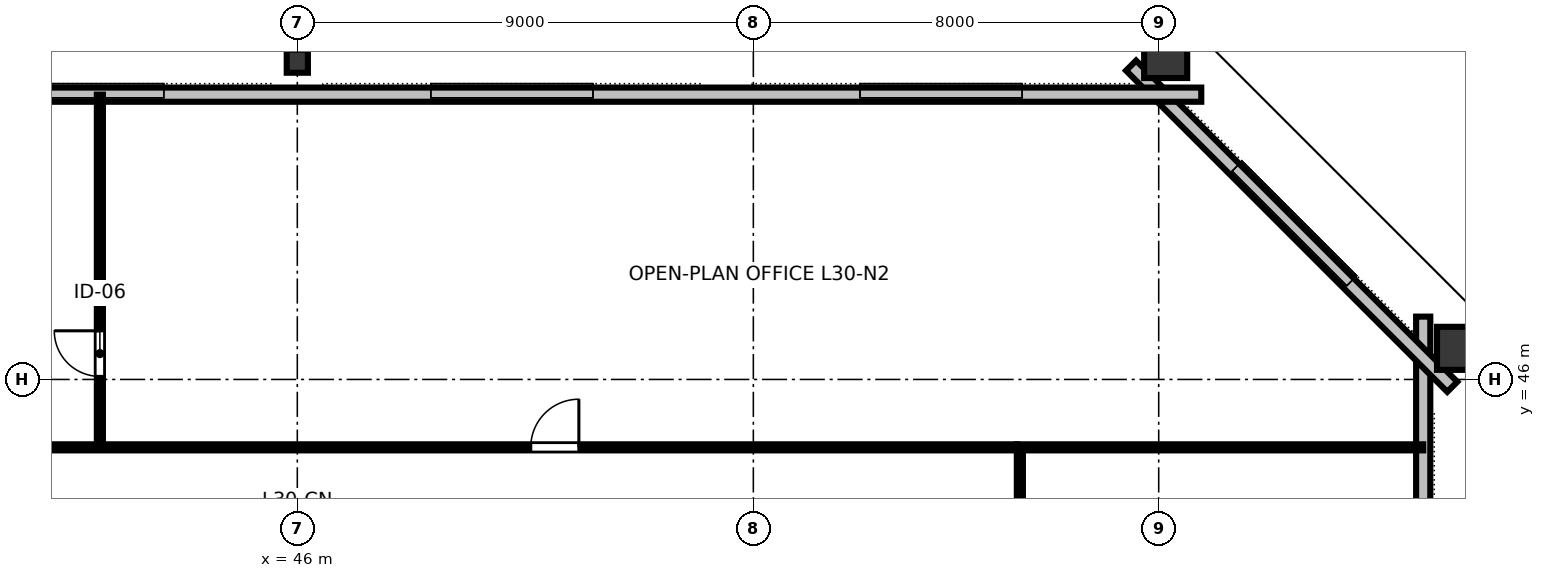
"""IFC4 building model, lengths in metres.
Left out: names, types, materials, properties, quantities, classifications, styles, units other than length and angle.
Written with IfcOpenShell. Run it as: python <this file> out.ifc"""

import sys

from ifc_helpers import new_model, si_unit, direction, frame, frame_2d, origin, origin_2d, place, context, subcontext, project, spatial, rectangle, hollow_rectangle, i_section, extrude, element, fill, save


model = new_model("IFC4")
c1 = context("Model", 3, precision=1e-05, world=origin(), true_north=direction((0.0, 1.0)))
c2 = subcontext(c1, "Body", "Model", "MODEL_VIEW")
j1 = project(units=[si_unit("LENGTHUNIT", "METRE"), si_unit("PLANEANGLEUNIT", "RADIAN")], contexts=[c1])
p1 = place(None, origin())
s1 = spatial("IfcSite", under=j1, at=p1, CompositionType="ELEMENT")
p2 = place(p1, origin())
s2 = spatial("IfcBuilding", under=s1, at=p2, CompositionType="ELEMENT")
p3 = place(p2, frame((0.0, 0.0, 116.8)))
s3 = spatial("IfcBuildingStorey", under=s2, at=p3, CompositionType="ELEMENT", Elevation=116.8)
for number, where, z_axis, x_axis in (
    (1, (68.992, 46.614, 0.0), (0.0, 0.0, 1.0), (0.0, 1.0, 0.0)),
    (2, (63.137, 52.448, 0.0), (0.0, 0.0, 1.0), (1.0, 0.0, 0.0)),
):
    element("IfcColumn", number, at=place(p3, frame(where, z_axis=z_axis, x_axis=x_axis)), inside=s3, PredefinedType="COLUMN", context=c2, shape_type="SweptSolid", body=[
        extrude(hollow_rectangle(XDim=0.85, YDim=1.0, WallThickness=0.05, at=origin_2d()), origin(), (0.0, 0.0, 1.0), 3.358),
    ])
p4 = place(p3, frame((46.0, 52.28, 0.0), z_axis=(0.0, 0.0, 1.0), x_axis=(1.0, 0.0, 0.0)))
e3 = element("IfcColumn", 3, at=p4, inside=s3, PredefinedType="COLUMN", context=c2, shape_type="SweptSolid", body=[
    extrude(i_section(OverallWidth=0.418, OverallDepth=0.455, WebThickness=0.042, FlangeThickness=0.068, FilletRadius=0.025, at=origin_2d()), origin(), (0.0, 0.0, 1.0), 3.358),
])
p5 = place(p3, frame((68.22, 16.76, 0.0), z_axis=(0.0, 0.0, 1.0), x_axis=(0.0, 1.0, 0.0)))
e4 = element("IfcWall", 4, at=p5, inside=s3, PredefinedType="STANDARD", context=c2, shape_type="SweptSolid", body=[
    extrude(rectangle(XDim=30.48, YDim=0.28, at=frame_2d((15.24, 0.0))), origin(), (0.0, 0.0, 1.0), 3.36),
])
p6 = place(p3, frame((68.794, 45.854, 0.0), z_axis=(0.0, 0.0, 1.0), x_axis=(-0.707106781187, 0.707106781187, 0.0)))
e5 = element("IfcWall", 5, at=p6, inside=s3, PredefinedType="STANDARD", context=c2, shape_type="SweptSolid", body=[
    extrude(rectangle(XDim=8.965, YDim=0.28, at=frame_2d((4.482, 0.0))), origin(), (0.0, 0.0, 1.0), 3.36),
])
p7 = place(p3, frame((63.84, 51.62, 0.0), z_axis=(0.0, 0.0, 1.0), x_axis=(-1.0, 0.0, 0.0)))
e6 = element("IfcWall", 6, at=p7, inside=s3, PredefinedType="STANDARD", context=c2, shape_type="SweptSolid", body=[
    extrude(rectangle(XDim=35.68, YDim=0.28, at=frame_2d((17.84, 0.0))), origin(), (0.0, 0.0, 1.0), 3.36),
])
p8 = place(p3, frame((42.104, 44.66, 0.0), z_axis=(0.0, 0.0, 1.0), x_axis=(0.0, 1.0, 0.0)))
e7 = element("IfcWall", 7, at=p8, inside=s3, PredefinedType="PARTITIONING", context=c2, shape_type="SweptSolid", body=[
    extrude(rectangle(XDim=6.96, YDim=0.12, at=frame_2d((3.48, 0.0))), origin(), (0.0, 0.0, 1.0), 2.64),
])
p9 = place(p8, frame((1.4, 0.0, 0.0)))
e8 = element("IfcOpeningElement", 8, at=p9, cuts=e7, PredefinedType="OPENING", context=c2, shape_type="SweptSolid", body=[
    extrude(rectangle(XDim=0.9, YDim=2.15, at=frame_2d((0.45, 1.075))), frame((0.0, 0.07, 0.0), z_axis=(0.0, -1.0, 0.0), x_axis=(1.0, 0.0, 0.0)), (0.0, 0.0, 1.0), 0.14),
])
p10 = place(p3, frame((31.8, 44.66, 0.0), z_axis=(0.0, 0.0, 1.0), x_axis=(1.0, 0.0, 0.0)))
e9 = element("IfcWall", 9, at=p10, inside=s3, PredefinedType="PARTITIONING", context=c2, shape_type="SweptSolid", body=[
    extrude(rectangle(XDim=28.4, YDim=0.12, at=frame_2d((14.2, 0.0))), origin(), (0.0, 0.0, 1.0), 2.64),
])
p11 = place(p10, frame((4.747, 0.0, 0.0)))
e10 = element("IfcOpeningElement", 10, at=p11, cuts=e9, PredefinedType="OPENING", context=c2, shape_type="SweptSolid", body=[
    extrude(rectangle(XDim=0.95, YDim=2.15, at=frame_2d((0.475, 1.075))), frame((0.0, 0.07, 0.0), z_axis=(0.0, -1.0, 0.0), x_axis=(1.0, 0.0, 0.0)), (0.0, 0.0, 1.0), 0.14),
])
p12 = place(p10, frame((18.807, 0.0, 0.0)))
e11 = element("IfcOpeningElement", 11, at=p12, cuts=e9, PredefinedType="OPENING", context=c2, shape_type="SweptSolid", body=[
    extrude(rectangle(XDim=0.95, YDim=2.15, at=frame_2d((0.475, 1.075))), frame((0.0, 0.07, 0.0), z_axis=(0.0, -1.0, 0.0), x_axis=(1.0, 0.0, 0.0)), (0.0, 0.0, 1.0), 0.14),
])
p13 = place(p3, frame((60.26, 33.02, 0.0), z_axis=(0.0, 0.0, 1.0), x_axis=(0.0, 1.0, 0.0)))
e12 = element("IfcWall", 12, at=p13, inside=s3, PredefinedType="PARTITIONING", context=c2, shape_type="SweptSolid", body=[
    extrude(rectangle(XDim=11.58, YDim=0.12, at=frame_2d((5.79, 0.0))), origin(), (0.0, 0.0, 1.0), 2.64),
])
p14 = place(p13, frame((0.62, 0.0, 0.0)))
e13 = element("IfcOpeningElement", 13, at=p14, cuts=e12, PredefinedType="OPENING", context=c2, shape_type="SweptSolid", body=[
    extrude(rectangle(XDim=0.95, YDim=2.15, at=frame_2d((0.475, 1.075))), frame((0.0, 0.07, 0.0), z_axis=(0.0, -1.0, 0.0), x_axis=(1.0, 0.0, 0.0)), (0.0, 0.0, 1.0), 0.14),
])
p15 = place(p13, frame((6.31, 0.0, 0.0)))
e14 = element("IfcOpeningElement", 14, at=p15, cuts=e12, PredefinedType="OPENING", context=c2, shape_type="SweptSolid", body=[
    extrude(rectangle(XDim=0.95, YDim=2.15, at=frame_2d((0.475, 1.075))), frame((0.0, 0.07, 0.0), z_axis=(0.0, -1.0, 0.0), x_axis=(1.0, 0.0, 0.0)), (0.0, 0.0, 1.0), 0.14),
])
p16 = place(p3, frame((60.2, 44.66, 0.0), z_axis=(0.0, 0.0, 1.0), x_axis=(1.0, 0.0, 0.0)))
e15 = element("IfcWall", 15, at=p16, inside=s3, PredefinedType="PARTITIONING", context=c2, shape_type="SweptSolid", body=[
    extrude(rectangle(XDim=8.02, YDim=0.12, at=frame_2d((4.01, 0.0))), origin(), (0.0, 0.0, 1.0), 2.64),
])
p17 = place(p9, origin())
e16 = element("IfcDoor", 16, at=p17, inside=s3, OperationType="SINGLE_SWING_RIGHT", PredefinedType="DOOR", context=c2, shape_type="SweptSolid", body=[
    extrude(rectangle(XDim=0.9, YDim=2.15, at=frame_2d((0.45, 1.075))), frame((0.0, 0.025, 0.0), z_axis=(0.0, -1.0, 0.0), x_axis=(1.0, 0.0, 0.0)), (0.0, 0.0, 1.0), 0.05),
])
fill(e8, e16)
p18 = place(p12, origin())
e17 = element("IfcDoor", 17, at=p18, inside=s3, OperationType="SINGLE_SWING_RIGHT", PredefinedType="DOOR", context=c2, shape_type="SweptSolid", body=[
    extrude(rectangle(XDim=0.95, YDim=2.15, at=frame_2d((0.475, 1.075))), frame((0.0, 0.025, 0.0), z_axis=(0.0, -1.0, 0.0), x_axis=(1.0, 0.0, 0.0)), (0.0, 0.0, 1.0), 0.05),
])
fill(e11, e17)
save(model, sys.argv[1])
